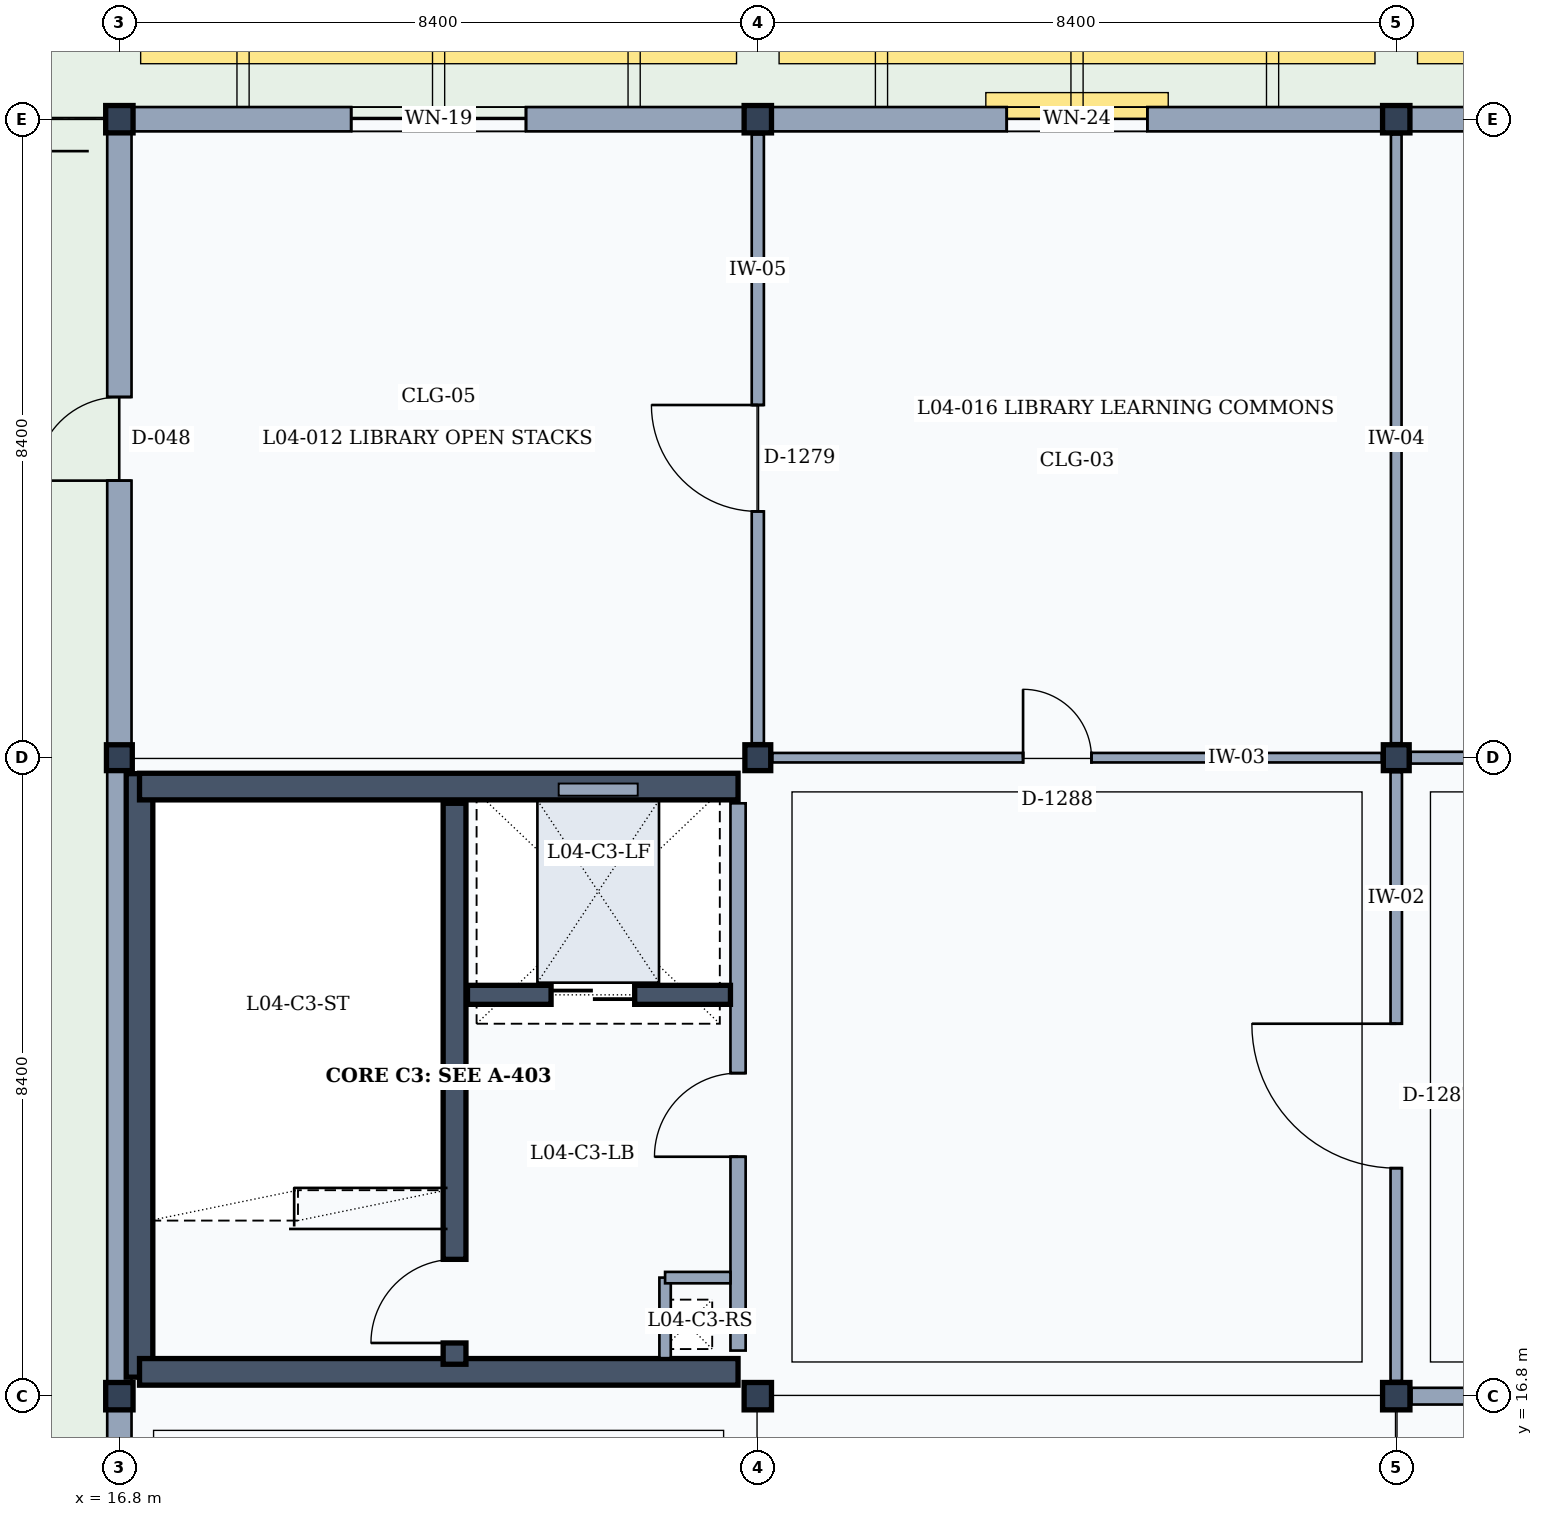
"""IFC4 building model, lengths in metres.
Left out: names, types, materials, properties, quantities, classifications, styles, units other than length and angle.
Written with IfcOpenShell. Run it as: python <this file> out.ifc"""

import sys

from ifc_helpers import new_model, si_unit, direction, frame, frame_2d, origin, origin_2d, place, context, subcontext, project, spatial, rectangle, extrude, element, fill, save


model = new_model("IFC4")
c1 = context("Model", 3, precision=1e-05, world=origin(), true_north=direction((0.0, 1.0)))
c2 = subcontext(c1, "Body", "Model", "MODEL_VIEW")
j1 = project(units=[si_unit("LENGTHUNIT", "METRE"), si_unit("PLANEANGLEUNIT", "RADIAN")], contexts=[c1])
p1 = place(None, origin())
s1 = spatial("IfcSite", under=j1, at=p1, CompositionType="ELEMENT")
p2 = place(p1, origin())
s2 = spatial("IfcBuilding", under=s1, at=p2, CompositionType="ELEMENT")
p3 = place(p2, frame((0.0, 0.0, 18.0)))
s3 = spatial("IfcBuildingStorey", under=s2, at=p3, CompositionType="ELEMENT", Elevation=18.0)
p4 = place(p3, frame((16.8, 16.8, 0.0), z_axis=(0.0, 0.0, 1.0), x_axis=(1.0, 0.0, 0.0)))
e1 = element("IfcColumn", 1, at=p4, inside=s3, PredefinedType="COLUMN", context=c2, shape_type="SweptSolid", body=[
    extrude(rectangle(XDim=0.36, YDim=0.36, at=origin_2d()), origin(), (0.0, 0.0, 1.0), 4.2),
])
p5 = place(p3, frame((16.8, 25.2, 0.0), z_axis=(0.0, 0.0, 1.0), x_axis=(1.0, 0.0, 0.0)))
e2 = element("IfcColumn", 2, at=p5, inside=s3, PredefinedType="COLUMN", context=c2, shape_type="SweptSolid", body=[
    extrude(rectangle(XDim=0.34, YDim=0.34, at=origin_2d()), origin(), (0.0, 0.0, 1.0), 4.2),
])
for number, where, z_axis, x_axis in (
    (3, (16.8, 33.6, 0.0), (0.0, 0.0, 1.0), (1.0, 0.0, 0.0)),
    (4, (25.2, 16.8, 0.0), (0.0, 0.0, 1.0), (1.0, 0.0, 0.0)),
):
    element("IfcColumn", number, at=place(p3, frame(where, z_axis=z_axis, x_axis=x_axis)), inside=s3, PredefinedType="COLUMN", context=c2, shape_type="SweptSolid", body=[
        extrude(rectangle(XDim=0.36, YDim=0.36, at=origin_2d()), origin(), (0.0, 0.0, 1.0), 4.2),
    ])
p6 = place(p3, frame((25.2, 25.2, 0.0), z_axis=(0.0, 0.0, 1.0), x_axis=(1.0, 0.0, 0.0)))
e5 = element("IfcColumn", 5, at=p6, inside=s3, PredefinedType="COLUMN", context=c2, shape_type="SweptSolid", body=[
    extrude(rectangle(XDim=0.34, YDim=0.34, at=origin_2d()), origin(), (0.0, 0.0, 1.0), 4.2),
])
for number, where, z_axis, x_axis in (
    (6, (25.2, 33.6, 0.0), (0.0, 0.0, 1.0), (1.0, 0.0, 0.0)),
    (7, (33.6, 16.8, 0.0), (0.0, 0.0, 1.0), (1.0, 0.0, 0.0)),
):
    element("IfcColumn", number, at=place(p3, frame(where, z_axis=z_axis, x_axis=x_axis)), inside=s3, PredefinedType="COLUMN", context=c2, shape_type="SweptSolid", body=[
        extrude(rectangle(XDim=0.36, YDim=0.36, at=origin_2d()), origin(), (0.0, 0.0, 1.0), 4.2),
    ])
p7 = place(p3, frame((33.6, 25.2, 0.0), z_axis=(0.0, 0.0, 1.0), x_axis=(1.0, 0.0, 0.0)))
e8 = element("IfcColumn", 8, at=p7, inside=s3, PredefinedType="COLUMN", context=c2, shape_type="SweptSolid", body=[
    extrude(rectangle(XDim=0.34, YDim=0.34, at=origin_2d()), origin(), (0.0, 0.0, 1.0), 4.2),
])
p8 = place(p3, frame((33.6, 33.6, 0.0), z_axis=(0.0, 0.0, 1.0), x_axis=(1.0, 0.0, 0.0)))
e9 = element("IfcColumn", 9, at=p8, inside=s3, PredefinedType="COLUMN", context=c2, shape_type="SweptSolid", body=[
    extrude(rectangle(XDim=0.36, YDim=0.36, at=origin_2d()), origin(), (0.0, 0.0, 1.0), 4.2),
])
p9 = place(p3, frame((16.8, 8.57, 0.0), z_axis=(0.0, 0.0, 1.0), x_axis=(0.0, 1.0, 0.0)))
e10 = element("IfcWall", 10, at=p9, inside=s3, PredefinedType="SOLIDWALL", context=c2, shape_type="SweptSolid", body=[
    extrude(rectangle(XDim=8.05, YDim=0.32, at=frame_2d((4.025, 0.0))), origin(), (0.0, 0.0, 1.0), 3.36),
])
p10 = place(p9, frame((3.475, 0.0, 0.0)))
e11 = element("IfcOpeningElement", 11, at=p10, cuts=e10, PredefinedType="OPENING", context=c2, shape_type="SweptSolid", body=[
    extrude(rectangle(XDim=1.1, YDim=2.2, at=frame_2d((0.55, 1.1))), frame((0.0, 0.17, 0.0), z_axis=(0.0, -1.0, 0.0), x_axis=(1.0, 0.0, 0.0)), (0.0, 0.0, 1.0), 0.34),
])
p11 = place(p3, frame((16.8, 16.98, 0.0), z_axis=(0.0, 0.0, 1.0), x_axis=(0.0, 1.0, 0.0)))
e12 = element("IfcWall", 12, at=p11, inside=s3, PredefinedType="SOLIDWALL", context=c2, shape_type="SweptSolid", body=[
    extrude(rectangle(XDim=8.05, YDim=0.32, at=frame_2d((4.025, 0.0))), origin(), (0.0, 0.0, 1.0), 3.36),
])
p12 = place(p3, frame((16.98, 33.6, 0.0), z_axis=(0.0, 0.0, 1.0), x_axis=(1.0, 0.0, 0.0)))
e13 = element("IfcWall", 13, at=p12, inside=s3, PredefinedType="SOLIDWALL", context=c2, shape_type="SweptSolid", body=[
    extrude(rectangle(XDim=8.04, YDim=0.32, at=frame_2d((4.02, 0.0))), origin(), (0.0, 0.0, 1.0), 3.36),
])
p13 = place(p12, frame((2.87, 0.0, 0.9)))
e14 = element("IfcOpeningElement", 14, at=p13, cuts=e13, PredefinedType="OPENING", context=c2, shape_type="SweptSolid", body=[
    extrude(rectangle(XDim=2.3, YDim=1.5, at=frame_2d((1.15, 0.75))), frame((0.0, 0.17, 0.0), z_axis=(0.0, -1.0, 0.0), x_axis=(1.0, 0.0, 0.0)), (0.0, 0.0, 1.0), 0.34),
])
p14 = place(p3, frame((16.8, 25.37, 0.0), z_axis=(0.0, 0.0, 1.0), x_axis=(0.0, 1.0, 0.0)))
e15 = element("IfcWall", 15, at=p14, inside=s3, PredefinedType="SOLIDWALL", context=c2, shape_type="SweptSolid", body=[
    extrude(rectangle(XDim=8.05, YDim=0.32, at=frame_2d((4.025, 0.0))), origin(), (0.0, 0.0, 1.0), 3.36),
])
p15 = place(p14, frame((3.475, 0.0, 0.0)))
e16 = element("IfcOpeningElement", 16, at=p15, cuts=e15, PredefinedType="OPENING", context=c2, shape_type="SweptSolid", body=[
    extrude(rectangle(XDim=1.1, YDim=2.2, at=frame_2d((0.55, 1.1))), frame((0.0, 0.17, 0.0), z_axis=(0.0, -1.0, 0.0), x_axis=(1.0, 0.0, 0.0)), (0.0, 0.0, 1.0), 0.34),
])
p16 = place(p3, frame((25.38, 33.6, 0.0), z_axis=(0.0, 0.0, 1.0), x_axis=(1.0, 0.0, 0.0)))
e17 = element("IfcWall", 17, at=p16, inside=s3, PredefinedType="SOLIDWALL", context=c2, shape_type="SweptSolid", body=[
    extrude(rectangle(XDim=8.04, YDim=0.32, at=frame_2d((4.02, 0.0))), origin(), (0.0, 0.0, 1.0), 3.36),
])
p17 = place(p16, frame((3.095, 0.0, 0.9)))
e18 = element("IfcOpeningElement", 18, at=p17, cuts=e17, PredefinedType="OPENING", context=c2, shape_type="SweptSolid", body=[
    extrude(rectangle(XDim=1.85, YDim=1.65, at=frame_2d((0.925, 0.825))), frame((0.0, 0.17, 0.0), z_axis=(0.0, -1.0, 0.0), x_axis=(1.0, 0.0, 0.0)), (0.0, 0.0, 1.0), 0.34),
])
p18 = place(p3, frame((33.78, 33.6, 0.0), z_axis=(0.0, 0.0, 1.0), x_axis=(1.0, 0.0, 0.0)))
e19 = element("IfcWall", 19, at=p18, inside=s3, PredefinedType="SOLIDWALL", context=c2, shape_type="SweptSolid", body=[
    extrude(rectangle(XDim=8.04, YDim=0.32, at=frame_2d((4.02, 0.0))), origin(), (0.0, 0.0, 1.0), 3.36),
])
p19 = place(p18, frame((3.445, 0.0, 0.9)))
e20 = element("IfcOpeningElement", 20, at=p19, cuts=e19, PredefinedType="OPENING", context=c2, shape_type="SweptSolid", body=[
    extrude(rectangle(XDim=1.15, YDim=1.65, at=frame_2d((0.575, 0.825))), frame((0.0, 0.17, 0.0), z_axis=(0.0, -1.0, 0.0), x_axis=(1.0, 0.0, 0.0)), (0.0, 0.0, 1.0), 0.34),
])
p20 = place(p3, frame((17.065, 17.05, 0.0), z_axis=(0.0, 0.0, 1.0), x_axis=(0.0, 1.0, 0.0)))
e21 = element("IfcWall", 21, at=p20, inside=s3, PredefinedType="SHEAR", context=c2, shape_type="SweptSolid", body=[
    extrude(rectangle(XDim=7.94, YDim=0.35, at=frame_2d((3.97, 0.0))), origin(), (0.0, 0.0, 1.0), 3.93),
])
p21 = place(p3, frame((17.065, 24.82, 0.0), z_axis=(0.0, 0.0, 1.0), x_axis=(1.0, 0.0, 0.0)))
e22 = element("IfcWall", 22, at=p21, inside=s3, PredefinedType="SHEAR", context=c2, shape_type="SweptSolid", body=[
    extrude(rectangle(XDim=7.875, YDim=0.35, at=frame_2d((3.938, 0.0))), origin(), (0.0, 0.0, 1.0), 3.93),
])
p22 = place(p3, frame((24.94, 24.6, 0.0), z_axis=(0.0, 0.0, 1.0), x_axis=(0.0, -1.0, 0.0)))
e23 = element("IfcWall", 23, at=p22, inside=s3, PredefinedType="PARTITIONING", context=c2, shape_type="SweptSolid", body=[
    extrude(rectangle(XDim=7.2, YDim=0.2, at=frame_2d((3.6, 0.0))), origin(), (0.0, 0.0, 1.0), 3.32),
])
p23 = place(p22, frame((3.55, 0.0, 0.0)))
e24 = element("IfcOpeningElement", 24, at=p23, cuts=e23, PredefinedType="OPENING", context=c2, shape_type="SweptSolid", body=[
    extrude(rectangle(XDim=1.1, YDim=2.15, at=frame_2d((0.55, 1.075))), frame((0.0, 0.11, 0.0), z_axis=(0.0, -1.0, 0.0), x_axis=(1.0, 0.0, 0.0)), (0.0, 0.0, 1.0), 0.22),
])
p24 = place(p3, frame((24.94, 17.12, 0.0), z_axis=(0.0, 0.0, 1.0), x_axis=(-1.0, 0.0, 0.0)))
e25 = element("IfcWall", 25, at=p24, inside=s3, PredefinedType="SHEAR", context=c2, shape_type="SweptSolid", body=[
    extrude(rectangle(XDim=7.875, YDim=0.35, at=frame_2d((3.938, 0.0))), origin(), (0.0, 0.0, 1.0), 3.93),
])
p25 = place(p3, frame((21.21, 17.22, 0.0), z_axis=(0.0, 0.0, 1.0), x_axis=(0.0, 1.0, 0.0)))
e26 = element("IfcWall", 26, at=p25, inside=s3, PredefinedType="SHEAR", context=c2, shape_type="SweptSolid", body=[
    extrude(rectangle(XDim=7.38, YDim=0.3, at=frame_2d((3.69, 0.0))), origin(), (0.0, 0.0, 1.0), 3.93),
])
p26 = place(p25, frame((0.28, 0.0, 0.0)))
e27 = element("IfcOpeningElement", 27, at=p26, cuts=e26, PredefinedType="OPENING", context=c2, shape_type="SweptSolid", body=[
    extrude(rectangle(XDim=1.1, YDim=2.15, at=frame_2d((0.55, 1.075))), frame((0.0, 0.16, 0.0), z_axis=(0.0, -1.0, 0.0), x_axis=(1.0, 0.0, 0.0)), (0.0, 0.0, 1.0), 0.32),
])
p27 = place(p3, frame((23.98, 18.36, 0.0), z_axis=(0.0, 0.0, 1.0), x_axis=(0.0, -1.0, 0.0)))
e28 = element("IfcWall", 28, at=p27, inside=s3, PredefinedType="PARTITIONING", context=c2, shape_type="SweptSolid", body=[
    extrude(rectangle(XDim=1.06, YDim=0.15, at=frame_2d((0.53, 0.0))), origin(), (0.0, 0.0, 1.0), 3.32),
])
p28 = place(p3, frame((23.98, 18.36, 0.0), z_axis=(0.0, 0.0, 1.0), x_axis=(1.0, 0.0, 0.0)))
e29 = element("IfcWall", 29, at=p28, inside=s3, PredefinedType="PARTITIONING", context=c2, shape_type="SweptSolid", body=[
    extrude(rectangle(XDim=0.86, YDim=0.15, at=frame_2d((0.43, 0.0))), origin(), (0.0, 0.0, 1.0), 3.32),
])
p29 = place(p3, frame((21.38, 22.08, 0.0), z_axis=(0.0, 0.0, 1.0), x_axis=(1.0, 0.0, 0.0)))
e30 = element("IfcWall", 30, at=p29, inside=s3, PredefinedType="SHEAR", context=c2, shape_type="SweptSolid", body=[
    extrude(rectangle(XDim=3.46, YDim=0.25, at=frame_2d((1.73, 0.0))), origin(), (0.0, 0.0, 1.0), 3.93),
])
p30 = place(p29, frame((1.1, 0.0, 0.0)))
e31 = element("IfcOpeningElement", 31, at=p30, cuts=e30, PredefinedType="OPENING", context=c2, shape_type="SweptSolid", body=[
    extrude(rectangle(XDim=1.1, YDim=2.15, at=frame_2d((0.55, 1.075))), frame((0.0, 0.135, 0.0), z_axis=(0.0, -1.0, 0.0), x_axis=(1.0, 0.0, 0.0)), (0.0, 0.0, 1.0), 0.27),
])
p31 = place(p3, frame((25.2, 25.39, 0.0), z_axis=(0.0, 0.0, 1.0), x_axis=(0.0, 1.0, 0.0)))
e32 = element("IfcWall", 32, at=p31, inside=s3, PredefinedType="PARTITIONING", context=c2, shape_type="SweptSolid", body=[
    extrude(rectangle(XDim=8.01, YDim=0.16, at=frame_2d((4.005, 0.0))), origin(), (0.0, 0.0, 1.0), 3.32),
])
p32 = place(p31, frame((3.05, 0.0, 0.0)))
e33 = element("IfcOpeningElement", 33, at=p32, cuts=e32, PredefinedType="OPENING", context=c2, shape_type="SweptSolid", body=[
    extrude(rectangle(XDim=1.4, YDim=2.25, at=frame_2d((0.7, 1.125))), frame((0.0, 0.09, 0.0), z_axis=(0.0, -1.0, 0.0), x_axis=(1.0, 0.0, 0.0)), (0.0, 0.0, 1.0), 0.18),
])
p33 = place(p3, frame((33.6, 17.0, 0.0), z_axis=(0.0, 0.0, 1.0), x_axis=(0.0, 1.0, 0.0)))
e34 = element("IfcWall", 34, at=p33, inside=s3, PredefinedType="PARTITIONING", context=c2, shape_type="SweptSolid", body=[
    extrude(rectangle(XDim=8.01, YDim=0.15, at=frame_2d((4.005, 0.0))), origin(), (0.0, 0.0, 1.0), 3.32),
])
p34 = place(p33, frame((2.8, 0.0, 0.0)))
e35 = element("IfcOpeningElement", 35, at=p34, cuts=e34, PredefinedType="OPENING", context=c2, shape_type="SweptSolid", body=[
    extrude(rectangle(XDim=1.9, YDim=2.4, at=frame_2d((0.95, 1.2))), frame((0.0, 0.085, 0.0), z_axis=(0.0, -1.0, 0.0), x_axis=(1.0, 0.0, 0.0)), (0.0, 0.0, 1.0), 0.17),
])
p35 = place(p3, frame((25.39, 25.2, 0.0), z_axis=(0.0, 0.0, 1.0), x_axis=(1.0, 0.0, 0.0)))
e36 = element("IfcWall", 36, at=p35, inside=s3, PredefinedType="PARTITIONING", context=c2, shape_type="SweptSolid", body=[
    extrude(rectangle(XDim=8.02, YDim=0.125, at=frame_2d((4.01, 0.0))), origin(), (0.0, 0.0, 1.0), 3.32),
])
p36 = place(p35, frame((3.3, 0.0, 0.0)))
e37 = element("IfcOpeningElement", 37, at=p36, cuts=e36, PredefinedType="OPENING", context=c2, shape_type="SweptSolid", body=[
    extrude(rectangle(XDim=0.9, YDim=2.1, at=frame_2d((0.45, 1.05))), frame((0.0, 0.073, 0.0), z_axis=(0.0, -1.0, 0.0), x_axis=(1.0, 0.0, 0.0)), (0.0, 0.0, 1.0), 0.145),
])
p37 = place(p3, frame((33.6, 25.39, 0.0), z_axis=(0.0, 0.0, 1.0), x_axis=(0.0, 1.0, 0.0)))
e38 = element("IfcWall", 38, at=p37, inside=s3, PredefinedType="PARTITIONING", context=c2, shape_type="SweptSolid", body=[
    extrude(rectangle(XDim=8.01, YDim=0.14, at=frame_2d((4.005, 0.0))), origin(), (0.0, 0.0, 1.0), 3.32),
])
p38 = place(p3, frame((33.8, 16.8, 0.0), z_axis=(0.0, 0.0, 1.0), x_axis=(1.0, 0.0, 0.0)))
e39 = element("IfcWall", 39, at=p38, inside=s3, PredefinedType="PARTITIONING", context=c2, shape_type="SweptSolid", body=[
    extrude(rectangle(XDim=8.0, YDim=0.22, at=frame_2d((4.0, 0.0))), origin(), (0.0, 0.0, 1.0), 3.32),
])
p39 = place(p3, frame((33.79, 25.2, 0.0), z_axis=(0.0, 0.0, 1.0), x_axis=(1.0, 0.0, 0.0)))
e40 = element("IfcWall", 40, at=p39, inside=s3, PredefinedType="PARTITIONING", context=c2, shape_type="SweptSolid", body=[
    extrude(rectangle(XDim=8.02, YDim=0.155, at=frame_2d((4.01, 0.0))), origin(), (0.0, 0.0, 1.0), 3.32),
])
p40 = place(p39, frame((3.25, 0.0, 0.0)))
e41 = element("IfcOpeningElement", 41, at=p40, cuts=e40, PredefinedType="OPENING", context=c2, shape_type="SweptSolid", body=[
    extrude(rectangle(XDim=1.0, YDim=2.15, at=frame_2d((0.5, 1.075))), frame((0.0, 0.087, 0.0), z_axis=(0.0, -1.0, 0.0), x_axis=(1.0, 0.0, 0.0)), (0.0, 0.0, 1.0), 0.175),
])
p41 = place(p13, origin())
e42 = element("IfcWindow", 42, at=p41, inside=s3, PartitioningType="SINGLE_PANEL", PredefinedType="WINDOW", context=c2, shape_type="SweptSolid", body=[
    extrude(rectangle(XDim=2.3, YDim=1.5, at=frame_2d((1.15, 0.75))), frame((0.0, 0.03, 0.0), z_axis=(0.0, -1.0, 0.0), x_axis=(1.0, 0.0, 0.0)), (0.0, 0.0, 1.0), 0.06),
])
fill(e14, e42)
p42 = place(p15, origin())
e43 = element("IfcDoor", 43, at=p42, inside=s3, OperationType="SINGLE_SWING_LEFT", PredefinedType="DOOR", context=c2, shape_type="SweptSolid", body=[
    extrude(rectangle(XDim=1.1, YDim=2.2, at=frame_2d((0.55, 1.1))), frame((0.0, 0.025, 0.0), z_axis=(0.0, -1.0, 0.0), x_axis=(1.0, 0.0, 0.0)), (0.0, 0.0, 1.0), 0.05),
])
fill(e16, e43)
p43 = place(p17, origin())
e44 = element("IfcWindow", 44, at=p43, inside=s3, PartitioningType="SINGLE_PANEL", PredefinedType="WINDOW", context=c2, shape_type="SweptSolid", body=[
    extrude(rectangle(XDim=1.85, YDim=1.65, at=frame_2d((0.925, 0.825))), frame((0.0, 0.03, 0.0), z_axis=(0.0, -1.0, 0.0), x_axis=(1.0, 0.0, 0.0)), (0.0, 0.0, 1.0), 0.06),
])
fill(e18, e44)
p44 = place(p23, frame((1.1, 0.0, 0.0), z_axis=(0.0, 0.0, 1.0), x_axis=(-1.0, 0.0, 0.0)))
e45 = element("IfcDoor", 45, at=p44, inside=s3, OperationType="SINGLE_SWING_LEFT", PredefinedType="DOOR", context=c2, shape_type="SweptSolid", body=[
    extrude(rectangle(XDim=1.1, YDim=2.15, at=frame_2d((0.55, 1.075))), frame((0.0, 0.025, 0.0), z_axis=(0.0, -1.0, 0.0), x_axis=(1.0, 0.0, 0.0)), (0.0, 0.0, 1.0), 0.05),
])
fill(e24, e45)
p45 = place(p26, origin())
e46 = element("IfcDoor", 46, at=p45, inside=s3, OperationType="SINGLE_SWING_LEFT", PredefinedType="DOOR", context=c2, shape_type="SweptSolid", body=[
    extrude(rectangle(XDim=1.1, YDim=2.15, at=frame_2d((0.55, 1.075))), frame((0.0, 0.025, 0.0), z_axis=(0.0, -1.0, 0.0), x_axis=(1.0, 0.0, 0.0)), (0.0, 0.0, 1.0), 0.05),
])
fill(e27, e46)
p46 = place(p30, origin())
e47 = element("IfcDoor", 47, at=p46, inside=s3, OperationType="DOUBLE_DOOR_SLIDING", PredefinedType="DOOR", context=c2, shape_type="SweptSolid", body=[
    extrude(rectangle(XDim=1.1, YDim=2.15, at=frame_2d((0.55, 1.075))), frame((0.0, 0.025, 0.0), z_axis=(0.0, -1.0, 0.0), x_axis=(1.0, 0.0, 0.0)), (0.0, 0.0, 1.0), 0.05),
])
fill(e31, e47)
p47 = place(p32, origin())
e48 = element("IfcDoor", 48, at=p47, inside=s3, OperationType="SINGLE_SWING_RIGHT", PredefinedType="DOOR", context=c2, shape_type="SweptSolid", body=[
    extrude(rectangle(XDim=1.4, YDim=2.25, at=frame_2d((0.7, 1.125))), frame((0.0, 0.025, 0.0), z_axis=(0.0, -1.0, 0.0), x_axis=(1.0, 0.0, 0.0)), (0.0, 0.0, 1.0), 0.05),
])
fill(e33, e48)
p48 = place(p34, origin())
e49 = element("IfcDoor", 49, at=p48, inside=s3, OperationType="SINGLE_SWING_RIGHT", PredefinedType="DOOR", context=c2, shape_type="SweptSolid", body=[
    extrude(rectangle(XDim=1.9, YDim=2.4, at=frame_2d((0.95, 1.2))), frame((0.0, 0.025, 0.0), z_axis=(0.0, -1.0, 0.0), x_axis=(1.0, 0.0, 0.0)), (0.0, 0.0, 1.0), 0.05),
])
fill(e35, e49)
p49 = place(p36, origin())
e50 = element("IfcDoor", 50, at=p49, inside=s3, OperationType="SINGLE_SWING_LEFT", PredefinedType="DOOR", context=c2, shape_type="SweptSolid", body=[
    extrude(rectangle(XDim=0.9, YDim=2.1, at=frame_2d((0.45, 1.05))), frame((0.0, 0.025, 0.0), z_axis=(0.0, -1.0, 0.0), x_axis=(1.0, 0.0, 0.0)), (0.0, 0.0, 1.0), 0.05),
])
fill(e37, e50)
save(model, sys.argv[1])
